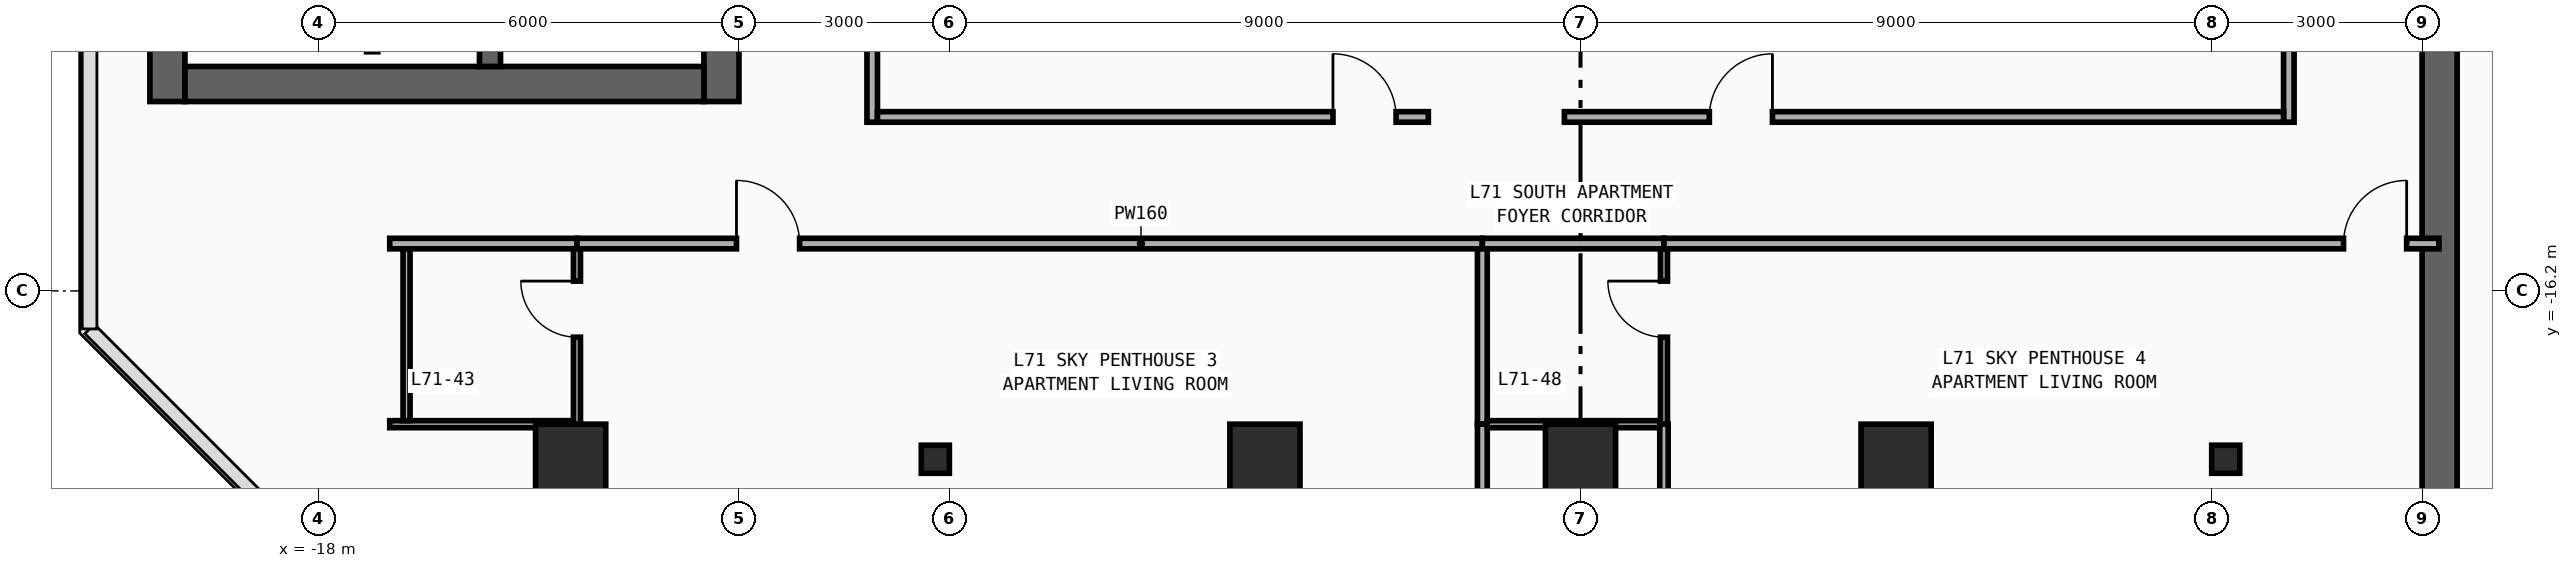
"""IFC4 building model, lengths in metres.
Left out: names, types, materials, properties, quantities, classifications, styles, units other than length and angle.
Written with IfcOpenShell. Run it as: python <this file> out.ifc"""

import sys

from ifc_helpers import new_model, si_unit, direction, frame, frame_2d, origin, origin_2d, place, context, subcontext, project, spatial, rectangle, circle, i_section, extrude, element, fill, save


model = new_model("IFC4")
c1 = context("Model", 3, precision=1e-05, world=origin(), true_north=direction((0.0, 1.0)))
c2 = subcontext(c1, "Body", "Model", "MODEL_VIEW")
j1 = project(units=[si_unit("LENGTHUNIT", "METRE"), si_unit("PLANEANGLEUNIT", "RADIAN")], contexts=[c1])
p1 = place(None, origin())
s1 = spatial("IfcSite", under=j1, at=p1, CompositionType="ELEMENT")
p2 = place(p1, origin())
s2 = spatial("IfcBuilding", under=s1, at=p2, CompositionType="ELEMENT")
p3 = place(p2, frame((0.0, 0.0, 296.6)))
s3 = spatial("IfcBuildingStorey", under=s2, at=p3, CompositionType="ELEMENT", Elevation=296.6)
p4 = place(p3, frame((-20.15, -13.5, 0.0), z_axis=(0.0, 0.0, 1.0), x_axis=(0.0, 1.0, 0.0)))
e1 = element("IfcWall", 1, at=p4, inside=s3, PredefinedType="SHEAR", context=c2, shape_type="SweptSolid", body=[
    extrude(rectangle(XDim=27.0, YDim=0.5, at=frame_2d((13.5, 0.0))), origin(), (0.0, 0.0, 1.0), 3.54),
])
p5 = place(p3, frame((-12.25, -13.5, 0.0), z_axis=(0.0, 0.0, 1.0), x_axis=(0.0, 1.0, 0.0)))
e2 = element("IfcWall", 2, at=p5, inside=s3, PredefinedType="SHEAR", context=c2, shape_type="SweptSolid", body=[
    extrude(rectangle(XDim=27.0, YDim=0.5, at=frame_2d((13.5, 0.0))), origin(), (0.0, 0.0, 1.0), 3.54),
])
p6 = place(p5, frame((15.175, 0.0, 0.0)))
e3 = element("IfcOpeningElement", 3, at=p6, cuts=e2, PredefinedType="OPENING", context=c2, shape_type="SweptSolid", body=[
    extrude(rectangle(XDim=0.85, YDim=2.1, at=frame_2d((0.425, 1.05))), frame((0.0, 0.26, 0.0), z_axis=(0.0, -1.0, 0.0), x_axis=(1.0, 0.0, 0.0)), (0.0, 0.0, 1.0), 0.52),
])
p7 = place(p5, frame((21.275, 0.0, 0.0)))
e4 = element("IfcOpeningElement", 4, at=p7, cuts=e2, PredefinedType="OPENING", context=c2, shape_type="SweptSolid", body=[
    extrude(rectangle(XDim=0.85, YDim=2.1, at=frame_2d((0.425, 1.05))), frame((0.0, 0.26, 0.0), z_axis=(0.0, -1.0, 0.0), x_axis=(1.0, 0.0, 0.0)), (0.0, 0.0, 1.0), 0.52),
])
p8 = place(p5, frame((4.275, 0.0, 0.0)))
e5 = element("IfcOpeningElement", 5, at=p8, cuts=e2, PredefinedType="OPENING", context=c2, shape_type="SweptSolid", body=[
    extrude(rectangle(XDim=0.85, YDim=2.1, at=frame_2d((0.425, 1.05))), frame((0.0, 0.26, 0.0), z_axis=(0.0, -1.0, 0.0), x_axis=(1.0, 0.0, 0.0)), (0.0, 0.0, 1.0), 0.52),
])
p9 = place(p5, frame((10.275, 0.0, 0.0)))
e6 = element("IfcOpeningElement", 6, at=p9, cuts=e2, PredefinedType="OPENING", context=c2, shape_type="SweptSolid", body=[
    extrude(rectangle(XDim=0.85, YDim=2.1, at=frame_2d((0.425, 1.05))), frame((0.0, 0.26, 0.0), z_axis=(0.0, -1.0, 0.0), x_axis=(1.0, 0.0, 0.0)), (0.0, 0.0, 1.0), 0.52),
])
p10 = place(p5, frame((12.725, 0.0, 0.0)))
e7 = element("IfcOpeningElement", 7, at=p10, cuts=e2, PredefinedType="OPENING", context=c2, shape_type="SweptSolid", body=[
    extrude(rectangle(XDim=1.15, YDim=2.2, at=frame_2d((0.575, 1.1))), frame((0.0, 0.26, 0.0), z_axis=(0.0, -1.0, 0.0), x_axis=(1.0, 0.0, 0.0)), (0.0, 0.0, 1.0), 0.52),
])
p11 = place(p5, frame((1.625, 0.0, 0.0)))
e8 = element("IfcOpeningElement", 8, at=p11, cuts=e2, PredefinedType="OPENING", context=c2, shape_type="SweptSolid", body=[
    extrude(rectangle(XDim=0.85, YDim=2.1, at=frame_2d((0.425, 1.05))), frame((0.0, 0.26, 0.0), z_axis=(0.0, -1.0, 0.0), x_axis=(1.0, 0.0, 0.0)), (0.0, 0.0, 1.0), 0.52),
])
p12 = place(p3, frame((-19.9, -13.25, 0.0), z_axis=(0.0, 0.0, 1.0), x_axis=(1.0, 0.0, 0.0)))
e9 = element("IfcWall", 9, at=p12, inside=s3, PredefinedType="SHEAR", context=c2, shape_type="SweptSolid", body=[
    extrude(rectangle(XDim=7.4, YDim=0.5, at=frame_2d((3.7, 0.0))), origin(), (0.0, 0.0, 1.0), 3.54),
])
p13 = place(p3, frame((-15.55, -13.0, 0.0), z_axis=(0.0, 0.0, 1.0), x_axis=(0.0, 1.0, 0.0)))
e10 = element("IfcWall", 10, at=p13, inside=s3, PredefinedType="SHEAR", context=c2, shape_type="SweptSolid", body=[
    extrude(rectangle(XDim=26.0, YDim=0.3, at=frame_2d((13.0, 0.0))), origin(), (0.0, 0.0, 1.0), 3.54),
])
p14 = place(p13, frame((12.225, 0.0, 0.0)))
e11 = element("IfcOpeningElement", 11, at=p14, cuts=e10, PredefinedType="OPENING", context=c2, shape_type="SweptSolid", body=[
    extrude(rectangle(XDim=1.15, YDim=2.2, at=frame_2d((0.575, 1.1))), frame((0.0, 0.16, 0.0), z_axis=(0.0, -1.0, 0.0), x_axis=(1.0, 0.0, 0.0)), (0.0, 0.0, 1.0), 0.32),
])
p15 = place(p13, frame((1.125, 0.0, 0.0)))
e12 = element("IfcOpeningElement", 12, at=p15, cuts=e10, PredefinedType="OPENING", context=c2, shape_type="SweptSolid", body=[
    extrude(rectangle(XDim=0.85, YDim=2.1, at=frame_2d((0.425, 1.05))), frame((0.0, 0.16, 0.0), z_axis=(0.0, -1.0, 0.0), x_axis=(1.0, 0.0, 0.0)), (0.0, 0.0, 1.0), 0.32),
])
p16 = place(p3, frame((12.25, -19.8, 0.0), z_axis=(0.0, 0.0, 1.0), x_axis=(0.0, 1.0, 0.0)))
e13 = element("IfcWall", 13, at=p16, inside=s3, PredefinedType="SHEAR", context=c2, shape_type="SweptSolid", body=[
    extrude(rectangle(XDim=27.0, YDim=0.5, at=frame_2d((13.5, 0.0))), origin(), (0.0, 0.0, 1.0), 3.54),
])
p17 = place(p16, frame((23.05, 0.0, 0.0)))
e14 = element("IfcOpeningElement", 14, at=p17, cuts=e13, PredefinedType="OPENING", context=c2, shape_type="SweptSolid", body=[
    extrude(rectangle(XDim=1.1, YDim=2.2, at=frame_2d((0.55, 1.1))), frame((0.0, 0.26, 0.0), z_axis=(0.0, -1.0, 0.0), x_axis=(1.0, 0.0, 0.0)), (0.0, 0.0, 1.0), 0.52),
])
p18 = place(p16, frame((19.85, 0.0, 0.0)))
e15 = element("IfcOpeningElement", 15, at=p18, cuts=e13, PredefinedType="OPENING", context=c2, shape_type="SweptSolid", body=[
    extrude(rectangle(XDim=1.1, YDim=2.2, at=frame_2d((0.55, 1.1))), frame((0.0, 0.26, 0.0), z_axis=(0.0, -1.0, 0.0), x_axis=(1.0, 0.0, 0.0)), (0.0, 0.0, 1.0), 0.52),
])
p19 = place(p16, frame((16.65, 0.0, 0.0)))
e16 = element("IfcOpeningElement", 16, at=p19, cuts=e13, PredefinedType="OPENING", context=c2, shape_type="SweptSolid", body=[
    extrude(rectangle(XDim=1.1, YDim=2.2, at=frame_2d((0.55, 1.1))), frame((0.0, 0.26, 0.0), z_axis=(0.0, -1.0, 0.0), x_axis=(1.0, 0.0, 0.0)), (0.0, 0.0, 1.0), 0.52),
])
p20 = place(p16, frame((10.175, 0.0, 0.0)))
e17 = element("IfcOpeningElement", 17, at=p20, cuts=e13, PredefinedType="OPENING", context=c2, shape_type="SweptSolid", body=[
    extrude(rectangle(XDim=0.85, YDim=2.1, at=frame_2d((0.425, 1.05))), frame((0.0, 0.26, 0.0), z_axis=(0.0, -1.0, 0.0), x_axis=(1.0, 0.0, 0.0)), (0.0, 0.0, 1.0), 0.52),
])
p21 = place(p16, frame((12.725, 0.0, 0.0)))
e18 = element("IfcOpeningElement", 18, at=p21, cuts=e13, PredefinedType="OPENING", context=c2, shape_type="SweptSolid", body=[
    extrude(rectangle(XDim=1.15, YDim=2.2, at=frame_2d((0.575, 1.1))), frame((0.0, 0.26, 0.0), z_axis=(0.0, -1.0, 0.0), x_axis=(1.0, 0.0, 0.0)), (0.0, 0.0, 1.0), 0.52),
])
p22 = place(p16, frame((25.125, 0.0, 0.0)))
e19 = element("IfcOpeningElement", 19, at=p22, cuts=e13, PredefinedType="OPENING", context=c2, shape_type="SweptSolid", body=[
    extrude(rectangle(XDim=0.85, YDim=2.1, at=frame_2d((0.425, 1.05))), frame((0.0, 0.26, 0.0), z_axis=(0.0, -1.0, 0.0), x_axis=(1.0, 0.0, 0.0)), (0.0, 0.0, 1.0), 0.52),
])
for number, where, z_axis, x_axis in (
    (20, (-9.2, -18.6, 0.0), (0.0, 0.0, 1.0), (1.0, 0.0, 0.0)),
    (21, (9.2, -18.6, 0.0), (0.0, 0.0, 1.0), (1.0, 0.0, 0.0)),
):
    element("IfcColumn", number, at=place(p3, frame(where, z_axis=z_axis, x_axis=x_axis)), inside=s3, PredefinedType="COLUMN", context=c2, shape_type="SweptSolid", body=[
        extrude(i_section(OverallWidth=0.4, OverallDepth=0.4, WebThickness=0.013, FlangeThickness=0.021, FilletRadius=0.022, at=origin_2d()), origin(), (0.0, 0.0, 1.0), 3.8),
    ])
for number, where, z_axis, x_axis in (
    (22, (-14.4, -18.6, 0.0), (0.0, 0.0, 1.0), (1.0, 0.0, 0.0)),
    (23, (-4.5, -18.6, 0.0), (0.0, 0.0, 1.0), (1.0, 0.0, 0.0)),
    (24, (0.0, -18.6, 0.0), (0.0, 0.0, 1.0), (1.0, 0.0, 0.0)),
    (25, (4.5, -18.6, 0.0), (0.0, 0.0, 1.0), (1.0, 0.0, 0.0)),
):
    element("IfcColumn", number, at=place(p3, frame(where, z_axis=z_axis, x_axis=x_axis)), inside=s3, PredefinedType="COLUMN", context=c2, shape_type="SweptSolid", body=[
        extrude(circle(Radius=0.5, at=origin_2d()), origin(), (0.0, 0.0, 1.0), 3.8),
    ])
p23 = place(p3, frame((-10.1, -13.795, 0.0), z_axis=(0.0, 0.0, 1.0), x_axis=(0.0, 1.0, 0.0)))
e26 = element("IfcWall", 26, at=p23, inside=s3, PredefinedType="PARTITIONING", context=c2, shape_type="SweptSolid", body=[
    extrude(rectangle(XDim=11.205, YDim=0.15, at=frame_2d((5.603, 0.0))), origin(), (0.0, 0.0, 1.0), 3.54),
])
p24 = place(p23, frame((8.009, 0.0, 0.0)))
e27 = element("IfcOpeningElement", 27, at=p24, cuts=e26, PredefinedType="OPENING", context=c2, shape_type="SweptSolid", body=[
    extrude(rectangle(XDim=0.9, YDim=2.15, at=frame_2d((0.45, 1.075))), frame((0.0, 0.085, 0.0), z_axis=(0.0, -1.0, 0.0), x_axis=(1.0, 0.0, 0.0)), (0.0, 0.0, 1.0), 0.17),
])
p25 = place(p3, frame((10.1, -13.795, 0.0), z_axis=(0.0, 0.0, 1.0), x_axis=(0.0, 1.0, 0.0)))
e28 = element("IfcWall", 28, at=p25, inside=s3, PredefinedType="PARTITIONING", context=c2, shape_type="SweptSolid", body=[
    extrude(rectangle(XDim=8.575, YDim=0.15, at=frame_2d((4.288, 0.0))), origin(), (0.0, 0.0, 1.0), 3.54),
])
p26 = place(p25, frame((7.215, 0.0, 0.0)))
e29 = element("IfcOpeningElement", 29, at=p26, cuts=e28, PredefinedType="OPENING", context=c2, shape_type="SweptSolid", body=[
    extrude(rectangle(XDim=0.9, YDim=2.15, at=frame_2d((0.45, 1.075))), frame((0.0, 0.085, 0.0), z_axis=(0.0, -1.0, 0.0), x_axis=(1.0, 0.0, 0.0)), (0.0, 0.0, 1.0), 0.17),
])
p27 = place(p3, frame((-16.98, -15.525, 0.0), z_axis=(0.0, 0.0, 1.0), x_axis=(1.0, 0.0, 0.0)))
e30 = element("IfcWall", 30, at=p27, inside=s3, PredefinedType="PARTITIONING", context=c2, shape_type="SweptSolid", body=[
    extrude(rectangle(XDim=2.67, YDim=0.15, at=frame_2d((1.335, 0.0))), origin(), (0.0, 0.0, 1.0), 3.54),
])
p28 = place(p3, frame((-14.31, -15.525, 0.0), z_axis=(0.0, 0.0, 1.0), x_axis=(1.0, 0.0, 0.0)))
e31 = element("IfcWall", 31, at=p28, inside=s3, PredefinedType="PARTITIONING", context=c2, shape_type="SweptSolid", body=[
    extrude(rectangle(XDim=12.91, YDim=0.15, at=frame_2d((6.455, 0.0))), origin(), (0.0, 0.0, 1.0), 3.54),
])
p29 = place(p28, frame((2.275, 0.0, 0.0)))
e32 = element("IfcOpeningElement", 32, at=p29, cuts=e31, PredefinedType="OPENING", context=c2, shape_type="SweptSolid", body=[
    extrude(rectangle(XDim=0.9, YDim=2.15, at=frame_2d((0.45, 1.075))), frame((0.0, 0.085, 0.0), z_axis=(0.0, -1.0, 0.0), x_axis=(1.0, 0.0, 0.0)), (0.0, 0.0, 1.0), 0.17),
])
p30 = place(p3, frame((-1.4, -15.525, 0.0), z_axis=(0.0, 0.0, 1.0), x_axis=(1.0, 0.0, 0.0)))
e33 = element("IfcWall", 33, at=p30, inside=s3, PredefinedType="PARTITIONING", context=c2, shape_type="SweptSolid", body=[
    extrude(rectangle(XDim=2.59, YDim=0.15, at=frame_2d((1.295, 0.0))), origin(), (0.0, 0.0, 1.0), 3.54),
])
p31 = place(p3, frame((1.19, -15.525, 0.0), z_axis=(0.0, 0.0, 1.0), x_axis=(1.0, 0.0, 0.0)))
e34 = element("IfcWall", 34, at=p31, inside=s3, PredefinedType="PARTITIONING", context=c2, shape_type="SweptSolid", body=[
    extrude(rectangle(XDim=11.05, YDim=0.15, at=frame_2d((5.525, 0.0))), origin(), (0.0, 0.0, 1.0), 3.54),
])
p32 = place(p31, frame((9.69, 0.0, 0.0)))
e35 = element("IfcOpeningElement", 35, at=p32, cuts=e34, PredefinedType="OPENING", context=c2, shape_type="SweptSolid", body=[
    extrude(rectangle(XDim=0.9, YDim=2.15, at=frame_2d((0.45, 1.075))), frame((0.0, 0.085, 0.0), z_axis=(0.0, -1.0, 0.0), x_axis=(1.0, 0.0, 0.0)), (0.0, 0.0, 1.0), 0.17),
])
p33 = place(p3, frame((-10.025, -13.72, 0.0), z_axis=(0.0, 0.0, 1.0), x_axis=(1.0, 0.0, 0.0)))
e36 = element("IfcWall", 36, at=p33, inside=s3, PredefinedType="PARTITIONING", context=c2, shape_type="SweptSolid", body=[
    extrude(rectangle(XDim=7.855, YDim=0.15, at=frame_2d((3.927, 0.0))), origin(), (0.0, 0.0, 1.0), 3.54),
])
p34 = place(p33, frame((6.495, 0.0, 0.0)))
e37 = element("IfcOpeningElement", 37, at=p34, cuts=e36, PredefinedType="OPENING", context=c2, shape_type="SweptSolid", body=[
    extrude(rectangle(XDim=0.9, YDim=2.15, at=frame_2d((0.45, 1.075))), frame((0.0, 0.085, 0.0), z_axis=(0.0, -1.0, 0.0), x_axis=(1.0, 0.0, 0.0)), (0.0, 0.0, 1.0), 0.17),
])
p35 = place(p3, frame((-0.23, -13.72, 0.0), z_axis=(0.0, 0.0, 1.0), x_axis=(1.0, 0.0, 0.0)))
e38 = element("IfcWall", 38, at=p35, inside=s3, PredefinedType="PARTITIONING", context=c2, shape_type="SweptSolid", body=[
    extrude(rectangle(XDim=10.255, YDim=0.15, at=frame_2d((5.127, 0.0))), origin(), (0.0, 0.0, 1.0), 3.54),
])
p36 = place(p35, frame((2.067, 0.0, 0.0)))
e39 = element("IfcOpeningElement", 39, at=p36, cuts=e38, PredefinedType="OPENING", context=c2, shape_type="SweptSolid", body=[
    extrude(rectangle(XDim=0.9, YDim=2.15, at=frame_2d((0.45, 1.075))), frame((0.0, 0.085, 0.0), z_axis=(0.0, -1.0, 0.0), x_axis=(1.0, 0.0, 0.0)), (0.0, 0.0, 1.0), 0.17),
])
p37 = place(p3, frame((-16.98, -18.1, 0.0), z_axis=(0.0, 0.0, 1.0), x_axis=(1.0, 0.0, 0.0)))
e40 = element("IfcWall", 40, at=p37, inside=s3, PredefinedType="PARTITIONING", context=c2, shape_type="SweptSolid", body=[
    extrude(rectangle(XDim=2.62, YDim=0.1, at=frame_2d((1.31, 0.0))), origin(), (0.0, 0.0, 1.0), 3.54),
])
p38 = place(p3, frame((-14.31, -18.1, 0.0), z_axis=(0.0, 0.0, 1.0), x_axis=(0.0, 1.0, 0.0)))
e41 = element("IfcWall", 41, at=p38, inside=s3, PredefinedType="PARTITIONING", context=c2, shape_type="SweptSolid", body=[
    extrude(rectangle(XDim=2.5, YDim=0.1, at=frame_2d((1.25, 0.0))), origin(), (0.0, 0.0, 1.0), 2.64),
])
p39 = place(p38, frame((1.24, 0.0, 0.0)))
e42 = element("IfcOpeningElement", 42, at=p39, cuts=e41, PredefinedType="OPENING", context=c2, shape_type="SweptSolid", body=[
    extrude(rectangle(XDim=0.8, YDim=2.1, at=frame_2d((0.4, 1.05))), frame((0.0, 0.06, 0.0), z_axis=(0.0, -1.0, 0.0), x_axis=(1.0, 0.0, 0.0)), (0.0, 0.0, 1.0), 0.12),
])
p40 = place(p3, frame((-14.31, -20.1, 0.0), z_axis=(0.0, 0.0, 1.0), x_axis=(0.0, 1.0, 0.0)))
e43 = element("IfcWall", 43, at=p40, inside=s3, PredefinedType="PARTITIONING", context=c2, shape_type="SweptSolid", body=[
    extrude(rectangle(XDim=2.0, YDim=0.12, at=frame_2d((1.0, 0.0))), origin(), (0.0, 0.0, 1.0), 2.64),
])
p41 = place(p3, frame((-1.4, -18.1, 0.0), z_axis=(0.0, 0.0, 1.0), x_axis=(0.0, 1.0, 0.0)))
e44 = element("IfcWall", 44, at=p41, inside=s3, PredefinedType="PARTITIONING", context=c2, shape_type="SweptSolid", body=[
    extrude(rectangle(XDim=2.5, YDim=0.14, at=frame_2d((1.25, 0.0))), origin(), (0.0, 0.0, 1.0), 3.54),
])
p42 = place(p3, frame((-1.4, -20.1, 0.0), z_axis=(0.0, 0.0, 1.0), x_axis=(0.0, 1.0, 0.0)))
e45 = element("IfcWall", 45, at=p42, inside=s3, PredefinedType="PARTITIONING", context=c2, shape_type="SweptSolid", body=[
    extrude(rectangle(XDim=2.0, YDim=0.14, at=frame_2d((1.0, 0.0))), origin(), (0.0, 0.0, 1.0), 3.54),
])
p43 = place(p3, frame((-1.33, -18.1, 0.0), z_axis=(0.0, 0.0, 1.0), x_axis=(1.0, 0.0, 0.0)))
e46 = element("IfcWall", 46, at=p43, inside=s3, PredefinedType="PARTITIONING", context=c2, shape_type="SweptSolid", body=[
    extrude(rectangle(XDim=2.47, YDim=0.1, at=frame_2d((1.235, 0.0))), origin(), (0.0, 0.0, 1.0), 3.54),
])
p44 = place(p3, frame((1.19, -18.1, 0.0), z_axis=(0.0, 0.0, 1.0), x_axis=(0.0, 1.0, 0.0)))
e47 = element("IfcWall", 47, at=p44, inside=s3, PredefinedType="PARTITIONING", context=c2, shape_type="SweptSolid", body=[
    extrude(rectangle(XDim=2.5, YDim=0.1, at=frame_2d((1.25, 0.0))), origin(), (0.0, 0.0, 1.0), 3.54),
])
p45 = place(p44, frame((1.24, 0.0, 0.0)))
e48 = element("IfcOpeningElement", 48, at=p45, cuts=e47, PredefinedType="OPENING", context=c2, shape_type="SweptSolid", body=[
    extrude(rectangle(XDim=0.8, YDim=2.1, at=frame_2d((0.4, 1.05))), frame((0.0, 0.06, 0.0), z_axis=(0.0, -1.0, 0.0), x_axis=(1.0, 0.0, 0.0)), (0.0, 0.0, 1.0), 0.12),
])
p46 = place(p3, frame((1.19, -20.1, 0.0), z_axis=(0.0, 0.0, 1.0), x_axis=(0.0, 1.0, 0.0)))
e49 = element("IfcWall", 49, at=p46, inside=s3, PredefinedType="PARTITIONING", context=c2, shape_type="SweptSolid", body=[
    extrude(rectangle(XDim=2.0, YDim=0.12, at=frame_2d((1.0, 0.0))), origin(), (0.0, 0.0, 1.0), 3.54),
])
p47 = place(p3, frame((-16.74, -18.05, 0.0), z_axis=(0.0, 0.0, 1.0), x_axis=(0.0, 1.0, 0.0)))
e50 = element("IfcWall", 50, at=p47, inside=s3, PredefinedType="PARTITIONING", context=c2, shape_type="SweptSolid", body=[
    extrude(rectangle(XDim=2.45, YDim=0.1, at=frame_2d((1.225, 0.0))), origin(), (0.0, 0.0, 1.0), 3.54),
])
p48 = place(p29, origin())
e51 = element("IfcDoor", 51, at=p48, inside=s3, OperationType="SINGLE_SWING_LEFT", PredefinedType="DOOR", context=c2, shape_type="SweptSolid", body=[
    extrude(rectangle(XDim=0.9, YDim=2.15, at=frame_2d((0.45, 1.075))), frame((0.0, 0.025, 0.0), z_axis=(0.0, -1.0, 0.0), x_axis=(1.0, 0.0, 0.0)), (0.0, 0.0, 1.0), 0.05),
])
fill(e32, e51)
p49 = place(p32, origin())
e52 = element("IfcDoor", 52, at=p49, inside=s3, OperationType="SINGLE_SWING_RIGHT", PredefinedType="DOOR", context=c2, shape_type="SweptSolid", body=[
    extrude(rectangle(XDim=0.9, YDim=2.15, at=frame_2d((0.45, 1.075))), frame((0.0, 0.025, 0.0), z_axis=(0.0, -1.0, 0.0), x_axis=(1.0, 0.0, 0.0)), (0.0, 0.0, 1.0), 0.05),
])
fill(e35, e52)
p50 = place(p34, origin())
e53 = element("IfcDoor", 53, at=p50, inside=s3, OperationType="SINGLE_SWING_LEFT", PredefinedType="DOOR", context=c2, shape_type="SweptSolid", body=[
    extrude(rectangle(XDim=0.9, YDim=2.15, at=frame_2d((0.45, 1.075))), frame((0.0, 0.025, 0.0), z_axis=(0.0, -1.0, 0.0), x_axis=(1.0, 0.0, 0.0)), (0.0, 0.0, 1.0), 0.05),
])
fill(e37, e53)
p51 = place(p36, origin())
e54 = element("IfcDoor", 54, at=p51, inside=s3, OperationType="SINGLE_SWING_RIGHT", PredefinedType="DOOR", context=c2, shape_type="SweptSolid", body=[
    extrude(rectangle(XDim=0.9, YDim=2.15, at=frame_2d((0.45, 1.075))), frame((0.0, 0.025, 0.0), z_axis=(0.0, -1.0, 0.0), x_axis=(1.0, 0.0, 0.0)), (0.0, 0.0, 1.0), 0.05),
])
fill(e39, e54)
p52 = place(p39, origin())
e55 = element("IfcDoor", 55, at=p52, inside=s3, OperationType="SINGLE_SWING_RIGHT", PredefinedType="DOOR", context=c2, shape_type="SweptSolid", body=[
    extrude(rectangle(XDim=0.8, YDim=2.1, at=frame_2d((0.4, 1.05))), frame((0.0, 0.025, 0.0), z_axis=(0.0, -1.0, 0.0), x_axis=(1.0, 0.0, 0.0)), (0.0, 0.0, 1.0), 0.05),
])
fill(e42, e55)
p53 = place(p45, origin())
e56 = element("IfcDoor", 56, at=p53, inside=s3, OperationType="SINGLE_SWING_RIGHT", PredefinedType="DOOR", context=c2, shape_type="SweptSolid", body=[
    extrude(rectangle(XDim=0.8, YDim=2.1, at=frame_2d((0.4, 1.05))), frame((0.0, 0.025, 0.0), z_axis=(0.0, -1.0, 0.0), x_axis=(1.0, 0.0, 0.0)), (0.0, 0.0, 1.0), 0.05),
])
fill(e48, e56)
save(model, sys.argv[1])
